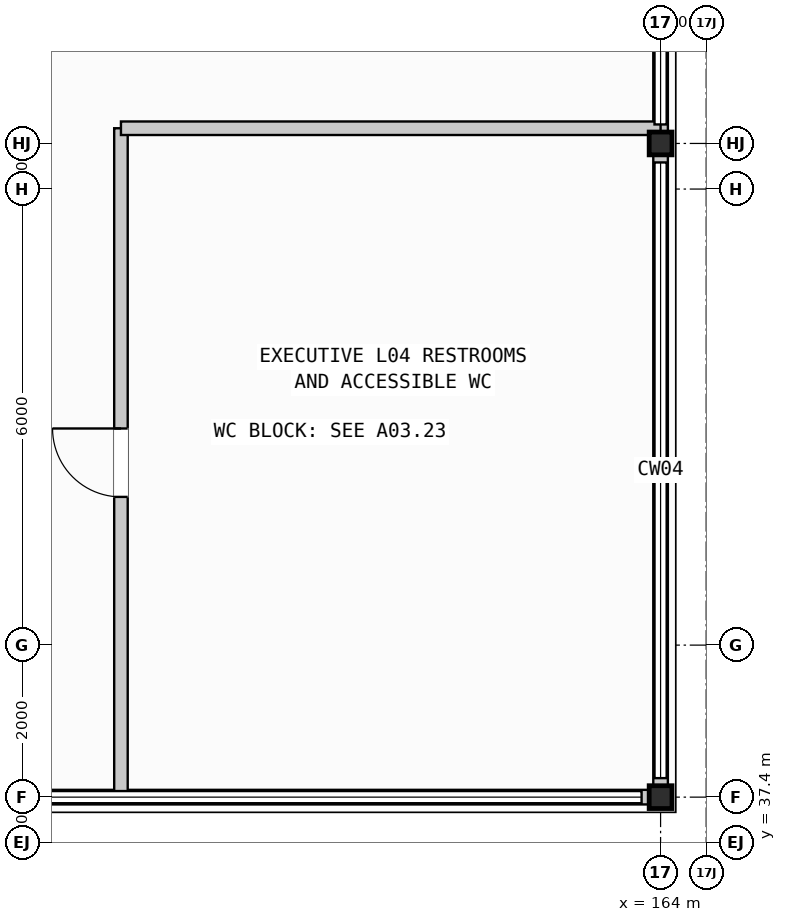
"""IFC4 building model, lengths in metres.
Left out: names, types, materials, properties, quantities, classifications, styles, units other than length and angle.
Written with IfcOpenShell. Run it as: python <this file> out.ifc"""

import sys

from ifc_helpers import new_model, si_unit, direction, frame, frame_2d, origin, origin_2d, place, context, subcontext, project, spatial, rectangle, i_section, extrude, element, fill, save


model = new_model("IFC4")
c1 = context("Model", 3, precision=1e-05, world=origin(), true_north=direction((0.0, 1.0)))
c2 = subcontext(c1, "Body", "Model", "MODEL_VIEW")
j1 = project(units=[si_unit("LENGTHUNIT", "METRE"), si_unit("PLANEANGLEUNIT", "RADIAN")], contexts=[c1])
p1 = place(None, origin())
s1 = spatial("IfcSite", under=j1, at=p1, CompositionType="ELEMENT")
p2 = place(p1, origin())
s2 = spatial("IfcBuilding", under=s1, at=p2, CompositionType="ELEMENT")
p3 = place(p2, frame((0.0, 0.0, 21.6)))
s3 = spatial("IfcBuildingStorey", under=s2, at=p3, CompositionType="ELEMENT", Elevation=21.6)
for number, where, z_axis, x_axis in (
    (1, (164.0, 38.0, 0.0), (0.0, 0.0, 1.0), (1.0, 0.0, 0.0)),
    (2, (164.0, 46.6, 0.0), (0.0, 0.0, 1.0), (1.0, 0.0, 0.0)),
):
    element("IfcColumn", number, at=place(p3, frame(where, z_axis=z_axis, x_axis=x_axis)), inside=s3, PredefinedType="COLUMN", context=c2, shape_type="SweptSolid", body=[
        extrude(i_section(OverallWidth=0.3, OverallDepth=0.3, WebThickness=0.011, FlangeThickness=0.019, FilletRadius=0.027, at=origin_2d()), origin(), (0.0, 0.0, 1.0), 4.8),
    ])
p4 = place(p3, frame((146.6, 38.0, 4.8), z_axis=(0.0, 0.0, 1.0), x_axis=(1.0, 0.0, 0.0)))
e3 = element("IfcWall", 3, at=p4, inside=s3, PredefinedType="PARAPET", context=c2, shape_type="SweptSolid", body=[
    extrude(rectangle(XDim=17.4, YDim=0.192, at=frame_2d((8.7, 0.0))), origin(), (0.0, 0.0, 1.0), 0.95),
])
p5 = place(p3, frame((164.0, 38.08, 4.8), z_axis=(0.0, 0.0, 1.0), x_axis=(0.0, 1.0, 0.0)))
e4 = element("IfcWall", 4, at=p5, inside=s3, PredefinedType="PARAPET", context=c2, shape_type="SweptSolid", body=[
    extrude(rectangle(XDim=59.84, YDim=0.192, at=frame_2d((29.92, 0.0))), origin(), (0.0, 0.0, 1.0), 0.95),
])
p6 = place(p3, frame((156.9, 38.0, 0.0), z_axis=(0.0, 0.0, 1.0), x_axis=(0.0, 1.0, 0.0)))
e5 = element("IfcWall", 5, at=p6, inside=s3, PredefinedType="PARTITIONING", context=c2, shape_type="SweptSolid", body=[
    extrude(rectangle(XDim=8.8, YDim=0.178, at=frame_2d((4.4, 0.0))), origin(), (0.0, 0.0, 1.0), 4.0),
])
p7 = place(p6, frame((3.95, 0.0, 0.0)))
e6 = element("IfcOpeningElement", 6, at=p7, cuts=e5, PredefinedType="OPENING", context=c2, shape_type="SweptSolid", body=[
    extrude(rectangle(XDim=0.9, YDim=2.08, at=frame_2d((0.45, 1.04))), frame((0.0, 0.099, 0.0), z_axis=(0.0, -1.0, 0.0), x_axis=(1.0, 0.0, 0.0)), (0.0, 0.0, 1.0), 0.198),
])
p8 = place(p3, frame((156.9, 46.8, 0.0), z_axis=(0.0, 0.0, 1.0), x_axis=(1.0, 0.0, 0.0)))
e7 = element("IfcWall", 7, at=p8, inside=s3, PredefinedType="PARTITIONING", context=c2, shape_type="SweptSolid", body=[
    extrude(rectangle(XDim=7.1, YDim=0.178, at=frame_2d((3.55, 0.0))), origin(), (0.0, 0.0, 1.0), 4.0),
])
p9 = place(p7, origin())
e8 = element("IfcDoor", 8, at=p9, inside=s3, OperationType="SINGLE_SWING_RIGHT", PredefinedType="DOOR", context=c2, shape_type="SweptSolid", body=[
    extrude(rectangle(XDim=0.9, YDim=2.08, at=frame_2d((0.45, 1.04))), frame((0.0, 0.025, 0.0), z_axis=(0.0, -1.0, 0.0), x_axis=(1.0, 0.0, 0.0)), (0.0, 0.0, 1.0), 0.05),
])
fill(e6, e8)
save(model, sys.argv[1])
